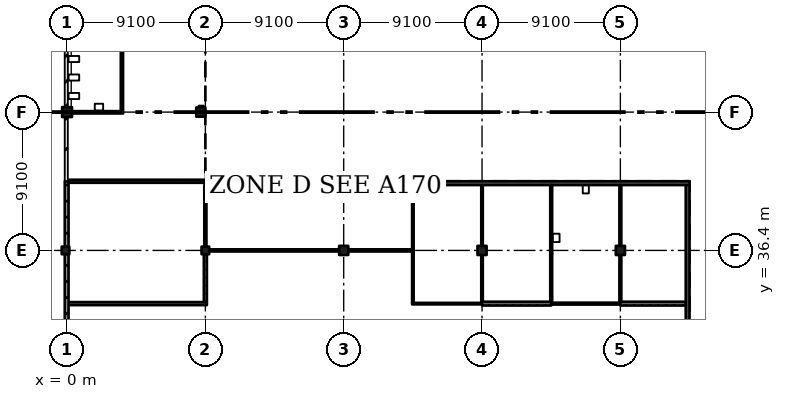
"""IFC4 building model, lengths in metres.
Left out: names, types, materials, properties, quantities, classifications, styles, units other than length and angle.
Written with IfcOpenShell. Run it as: python <this file> out.ifc"""

import sys

from ifc_helpers import new_model, si_unit, direction, frame, frame_2d, origin, origin_2d, place, context, subcontext, project, spatial, rectangle, extrude, element, fill, save


model = new_model("IFC4")
c1 = context("Model", 3, precision=1e-05, world=origin(), true_north=direction((0.0, 1.0)))
c2 = subcontext(c1, "Body", "Model", "MODEL_VIEW")
j1 = project(units=[si_unit("LENGTHUNIT", "METRE"), si_unit("PLANEANGLEUNIT", "RADIAN")], contexts=[c1])
p1 = place(None, origin())
s1 = spatial("IfcSite", under=j1, at=p1, CompositionType="ELEMENT")
p2 = place(p1, origin())
s2 = spatial("IfcBuilding", under=s1, at=p2, CompositionType="ELEMENT")
p3 = place(p2, frame((0.0, 0.0, 24.57)))
s3 = spatial("IfcBuildingStorey", under=s2, at=p3, CompositionType="ELEMENT", Elevation=24.57)
p4 = place(p3, frame((-0.1, 36.4, 0.0), z_axis=(0.0, 0.0, 1.0), x_axis=(1.0, 0.0, 0.0)))
e1 = element("IfcColumn", 1, at=p4, inside=s3, PredefinedType="COLUMN", context=c2, shape_type="SweptSolid", body=[
    extrude(rectangle(XDim=0.5, YDim=0.5, at=origin_2d()), origin(), (0.0, 0.0, 1.0), 4.55),
])
p5 = place(p3, frame((0.0, 45.5, 0.0), z_axis=(0.0, 0.0, 1.0), x_axis=(1.0, 0.0, 0.0)))
e2 = element("IfcColumn", 2, at=p5, inside=s3, PredefinedType="COLUMN", context=c2, shape_type="SweptSolid", body=[
    extrude(rectangle(XDim=0.65, YDim=0.65, at=origin_2d()), origin(), (0.0, 0.0, 1.0), 4.55),
])
p6 = place(p3, frame((9.1, 36.4, 0.0), z_axis=(0.0, 0.0, 1.0), x_axis=(1.0, 0.0, 0.0)))
e3 = element("IfcColumn", 3, at=p6, inside=s3, PredefinedType="COLUMN", context=c2, shape_type="SweptSolid", body=[
    extrude(rectangle(XDim=0.5, YDim=0.5, at=origin_2d()), origin(), (0.0, 0.0, 1.0), 4.55),
])
for number, where, z_axis, x_axis in (
    (4, (8.8, 45.5, 0.0), (0.0, 0.0, 1.0), (1.0, 0.0, 0.0)),
    (5, (18.2, 36.4, 0.0), (0.0, 0.0, 1.0), (1.0, 0.0, 0.0)),
    (6, (27.3, 36.4, 0.0), (0.0, 0.0, 1.0), (1.0, 0.0, 0.0)),
    (7, (36.4, 36.4, 0.0), (0.0, 0.0, 1.0), (1.0, 0.0, 0.0)),
):
    element("IfcColumn", number, at=place(p3, frame(where, z_axis=z_axis, x_axis=x_axis)), inside=s3, PredefinedType="COLUMN", context=c2, shape_type="SweptSolid", body=[
        extrude(rectangle(XDim=0.6, YDim=0.6, at=origin_2d()), origin(), (0.0, 0.0, 1.0), 4.55),
    ])
for number, where, z_axis, x_axis in (
    (8, (40.825, 40.95, 0.0), (0.0, 0.0, 1.0), (0.0, -1.0, 0.0)),
    (9, (40.95, 40.825, 0.0), (0.0, 0.0, 1.0), (-1.0, 0.0, 0.0)),
):
    element("IfcWall", number, at=place(p3, frame(where, z_axis=z_axis, x_axis=x_axis)), inside=s3, PredefinedType="SHEAR", context=c2, shape_type="SweptSolid", body=[
        extrude(rectangle(XDim=31.85, YDim=0.25, at=frame_2d((15.925, 0.0))), origin(), (0.0, 0.0, 1.0), 4.55),
    ])
p7 = place(p3, frame((-0.025, 40.95, 0.0), z_axis=(0.0, 0.0, 1.0), x_axis=(0.0, -1.0, 0.0)))
e10 = element("IfcWall", 10, at=p7, inside=s3, PredefinedType="SOLIDWALL", context=c2, shape_type="SweptSolid", body=[
    extrude(rectangle(XDim=4.3, YDim=0.25, at=frame_2d((2.15, 0.0))), origin(), (0.0, 0.0, 1.0), 3.6),
])
p8 = place(p3, frame((-0.025, 36.15, 0.0), z_axis=(0.0, 0.0, 1.0), x_axis=(0.0, -1.0, 0.0)))
e11 = element("IfcWall", 11, at=p8, inside=s3, PredefinedType="SOLIDWALL", context=c2, shape_type="SweptSolid", body=[
    extrude(rectangle(XDim=8.6, YDim=0.25, at=frame_2d((4.3, 0.0))), origin(), (0.0, 0.0, 1.0), 3.6),
])
p9 = place(p3, frame((0.1, 32.9, 0.0), z_axis=(0.0, 0.0, 1.0), x_axis=(1.0, 0.0, 0.0)))
e12 = element("IfcWall", 12, at=p9, inside=s3, PredefinedType="PARTITIONING", context=c2, shape_type="SweptSolid", body=[
    extrude(rectangle(XDim=9.1, YDim=0.2, at=frame_2d((4.55, 0.0))), origin(), (0.0, 0.0, 1.0), 4.35),
])
p10 = place(p9, frame((1.05, 0.0, 0.0)))
e13 = element("IfcOpeningElement", 13, at=p10, cuts=e12, PredefinedType="OPENING", context=c2, shape_type="SweptSolid", body=[
    extrude(rectangle(XDim=2.4, YDim=2.4, at=frame_2d((1.2, 1.2))), frame((0.0, 0.11, 0.0), z_axis=(0.0, -1.0, 0.0), x_axis=(1.0, 0.0, 0.0)), (0.0, 0.0, 1.0), 0.22),
])
p11 = place(p9, frame((5.65, 0.0, 0.0)))
e14 = element("IfcOpeningElement", 14, at=p11, cuts=e12, PredefinedType="OPENING", context=c2, shape_type="SweptSolid", body=[
    extrude(rectangle(XDim=2.4, YDim=2.4, at=frame_2d((1.2, 1.2))), frame((0.0, 0.11, 0.0), z_axis=(0.0, -1.0, 0.0), x_axis=(1.0, 0.0, 0.0)), (0.0, 0.0, 1.0), 0.22),
])
p12 = place(p3, frame((0.1, 40.95, 0.0), z_axis=(0.0, 0.0, 1.0), x_axis=(1.0, 0.0, 0.0)))
e15 = element("IfcWall", 15, at=p12, inside=s3, PredefinedType="PARTITIONING", context=c2, shape_type="SweptSolid", body=[
    extrude(rectangle(XDim=8.97, YDim=0.2, at=frame_2d((4.485, 0.0))), origin(), (0.0, 0.0, 1.0), 3.55),
])
p13 = place(p12, frame((4.75, 0.0, 0.0)))
e16 = element("IfcOpeningElement", 16, at=p13, cuts=e15, PredefinedType="OPENING", context=c2, shape_type="SweptSolid", body=[
    extrude(rectangle(XDim=3.0, YDim=2.4, at=frame_2d((1.5, 1.2))), frame((0.0, 0.11, 0.0), z_axis=(0.0, -1.0, 0.0), x_axis=(1.0, 0.0, 0.0)), (0.0, 0.0, 1.0), 0.22),
])
p14 = place(p12, frame((0.25, 0.0, 0.0)))
e17 = element("IfcOpeningElement", 17, at=p14, cuts=e15, PredefinedType="OPENING", context=c2, shape_type="SweptSolid", body=[
    extrude(rectangle(XDim=3.0, YDim=2.4, at=frame_2d((1.5, 1.2))), frame((0.0, 0.11, 0.0), z_axis=(0.0, -1.0, 0.0), x_axis=(1.0, 0.0, 0.0)), (0.0, 0.0, 1.0), 0.22),
])
p15 = place(p3, frame((0.325, 45.5, 0.0), z_axis=(0.0, 0.0, 1.0), x_axis=(1.0, 0.0, 0.0)))
e18 = element("IfcWall", 18, at=p15, inside=s3, PredefinedType="PARTITIONING", context=c2, shape_type="SweptSolid", body=[
    extrude(rectangle(XDim=3.338, YDim=0.125, at=frame_2d((1.669, 0.0))), origin(), (0.0, 0.0, 1.0), 3.9),
])
p16 = place(p3, frame((3.6, 45.562, 0.0), z_axis=(0.0, 0.0, 1.0), x_axis=(0.0, 1.0, 0.0)))
e19 = element("IfcWall", 19, at=p16, inside=s3, PredefinedType="PARTITIONING", context=c2, shape_type="SweptSolid", body=[
    extrude(rectangle(XDim=9.038, YDim=0.125, at=frame_2d((4.519, 0.0))), origin(), (0.0, 0.0, 1.0), 3.9),
])
p17 = place(p16, frame((1.75, 0.0, 0.0)))
e20 = element("IfcOpeningElement", 20, at=p17, cuts=e19, PredefinedType="OPENING", context=c2, shape_type="SweptSolid", body=[
    extrude(rectangle(XDim=0.9, YDim=2.1, at=frame_2d((0.45, 1.05))), frame((0.0, 0.073, 0.0), z_axis=(0.0, -1.0, 0.0), x_axis=(1.0, 0.0, 0.0)), (0.0, 0.0, 1.0), 0.145),
])
p18 = place(p16, frame((6.238, 0.0, 0.0)))
e21 = element("IfcOpeningElement", 21, at=p18, cuts=e19, PredefinedType="OPENING", context=c2, shape_type="SweptSolid", body=[
    extrude(rectangle(XDim=1.0, YDim=2.1, at=frame_2d((0.5, 1.05))), frame((0.0, 0.073, 0.0), z_axis=(0.0, -1.0, 0.0), x_axis=(1.0, 0.0, 0.0)), (0.0, 0.0, 1.0), 0.145),
])
p19 = place(p3, frame((8.975, 45.8, 0.0), z_axis=(0.0, 0.0, 1.0), x_axis=(-1.0, 0.0, 0.0)))
e22 = element("IfcWall", 22, at=p19, inside=s3, PredefinedType="PARTITIONING", context=c2, shape_type="SweptSolid", body=[
    extrude(rectangle(XDim=0.3, YDim=0.2, at=frame_2d((0.15, 0.0))), origin(), (0.0, 0.0, 1.0), 8.43),
])
p20 = place(p3, frame((9.1, 33.0, 0.0), z_axis=(0.0, 0.0, 1.0), x_axis=(0.0, 1.0, 0.0)))
e23 = element("IfcWall", 23, at=p20, inside=s3, PredefinedType="PARTITIONING", context=c2, shape_type="SweptSolid", body=[
    extrude(rectangle(XDim=3.15, YDim=0.2, at=frame_2d((1.575, 0.0))), origin(), (0.0, 0.0, 1.0), 3.6),
])
p21 = place(p20, frame((0.35, 0.0, 0.0)))
e24 = element("IfcOpeningElement", 24, at=p21, cuts=e23, PredefinedType="OPENING", context=c2, shape_type="SweptSolid", body=[
    extrude(rectangle(XDim=2.4, YDim=2.4, at=frame_2d((1.2, 1.2))), frame((0.0, 0.11, 0.0), z_axis=(0.0, -1.0, 0.0), x_axis=(1.0, 0.0, 0.0)), (0.0, 0.0, 1.0), 0.22),
])
p22 = place(p3, frame((9.1, 36.65, 0.0), z_axis=(0.0, 0.0, 1.0), x_axis=(0.0, 1.0, 0.0)))
e25 = element("IfcWall", 25, at=p22, inside=s3, PredefinedType="SOLIDWALL", context=c2, shape_type="SweptSolid", body=[
    extrude(rectangle(XDim=4.05, YDim=0.14, at=frame_2d((2.025, 0.0))), origin(), (0.0, 0.0, 1.0), 3.6),
])
p23 = place(p3, frame((17.9, 36.4, 0.0), z_axis=(0.0, 0.0, 1.0), x_axis=(-1.0, 0.0, 0.0)))
e26 = element("IfcWall", 26, at=p23, inside=s3, PredefinedType="SOLIDWALL", context=c2, shape_type="SweptSolid", body=[
    extrude(rectangle(XDim=8.55, YDim=0.14, at=frame_2d((4.275, 0.0))), origin(), (0.0, 0.0, 1.0), 3.6),
])
p24 = place(p23, frame((3.55, 0.0, 0.0)))
e27 = element("IfcOpeningElement", 27, at=p24, cuts=e26, PredefinedType="OPENING", context=c2, shape_type="SweptSolid", body=[
    extrude(rectangle(XDim=1.5, YDim=2.1, at=frame_2d((0.75, 1.05))), frame((0.0, 0.08, 0.0), z_axis=(0.0, -1.0, 0.0), x_axis=(1.0, 0.0, 0.0)), (0.0, 0.0, 1.0), 0.16),
])
p25 = place(p3, frame((22.7, 36.4, 0.0), z_axis=(0.0, 0.0, 1.0), x_axis=(-1.0, 0.0, 0.0)))
e28 = element("IfcWall", 28, at=p25, inside=s3, PredefinedType="SOLIDWALL", context=c2, shape_type="SweptSolid", body=[
    extrude(rectangle(XDim=4.2, YDim=0.14, at=frame_2d((2.1, 0.0))), origin(), (0.0, 0.0, 1.0), 3.6),
])
p26 = place(p3, frame((22.75, 32.95, 0.0), z_axis=(0.0, 0.0, 1.0), x_axis=(0.0, 1.0, 0.0)))
e29 = element("IfcWall", 29, at=p26, inside=s3, PredefinedType="SOLIDWALL", context=c2, shape_type="SweptSolid", body=[
    extrude(rectangle(XDim=3.45, YDim=0.1, at=frame_2d((1.725, 0.0))), origin(), (0.0, 0.0, 1.0), 3.65),
])
p27 = place(p3, frame((22.75, 40.7, 0.0), z_axis=(0.0, 0.0, 1.0), x_axis=(0.0, -1.0, 0.0)))
e30 = element("IfcWall", 30, at=p27, inside=s3, PredefinedType="SOLIDWALL", context=c2, shape_type="SweptSolid", body=[
    extrude(rectangle(XDim=4.3, YDim=0.1, at=frame_2d((2.15, 0.0))), origin(), (0.0, 0.0, 1.0), 4.35),
])
p28 = place(p3, frame((27.3, 32.9, 0.0), z_axis=(0.0, 0.0, 1.0), x_axis=(-1.0, 0.0, 0.0)))
e31 = element("IfcWall", 31, at=p28, inside=s3, PredefinedType="SOLIDWALL", context=c2, shape_type="SweptSolid", body=[
    extrude(rectangle(XDim=4.6, YDim=0.1, at=frame_2d((2.3, 0.0))), origin(), (0.0, 0.0, 1.0), 4.35),
])
p29 = place(p28, frame((1.85, 0.0, 0.0)))
e32 = element("IfcOpeningElement", 32, at=p29, cuts=e31, PredefinedType="OPENING", context=c2, shape_type="SweptSolid", body=[
    extrude(rectangle(XDim=1.0, YDim=2.0, at=frame_2d((0.5, 1.0))), frame((0.0, 0.06, 0.0), z_axis=(0.0, -1.0, 0.0), x_axis=(1.0, 0.0, 0.0)), (0.0, 0.0, 1.0), 0.12),
])
p30 = place(p3, frame((27.3, 36.1, 0.0), z_axis=(0.0, 0.0, 1.0), x_axis=(0.0, -1.0, 0.0)))
e33 = element("IfcWall", 33, at=p30, inside=s3, PredefinedType="SOLIDWALL", context=c2, shape_type="SweptSolid", body=[
    extrude(rectangle(XDim=3.075, YDim=0.1, at=frame_2d((1.538, 0.0))), origin(), (0.0, 0.0, 1.0), 3.6),
])
p31 = place(p3, frame((27.3, 40.7, 0.0), z_axis=(0.0, 0.0, 1.0), x_axis=(0.0, -1.0, 0.0)))
e34 = element("IfcWall", 34, at=p31, inside=s3, PredefinedType="SOLIDWALL", context=c2, shape_type="SweptSolid", body=[
    extrude(rectangle(XDim=4.0, YDim=0.1, at=frame_2d((2.0, 0.0))), origin(), (0.0, 0.0, 1.0), 4.35),
])
p32 = place(p3, frame((31.85, 32.9, 0.0), z_axis=(0.0, 0.0, 1.0), x_axis=(-1.0, 0.0, 0.0)))
e35 = element("IfcWall", 35, at=p32, inside=s3, PredefinedType="SOLIDWALL", context=c2, shape_type="SweptSolid", body=[
    extrude(rectangle(XDim=4.55, YDim=0.25, at=frame_2d((2.275, 0.0))), origin(), (0.0, 0.0, 1.0), 4.35),
])
p33 = place(p32, frame((1.75, 0.0, 0.0)))
e36 = element("IfcOpeningElement", 36, at=p33, cuts=e35, PredefinedType="OPENING", context=c2, shape_type="SweptSolid", body=[
    extrude(rectangle(XDim=1.0, YDim=2.1, at=frame_2d((0.5, 1.05))), frame((0.0, 0.135, 0.0), z_axis=(0.0, -1.0, 0.0), x_axis=(1.0, 0.0, 0.0)), (0.0, 0.0, 1.0), 0.27),
])
p34 = place(p3, frame((31.85, 40.7, 0.0), z_axis=(0.0, 0.0, 1.0), x_axis=(0.0, -1.0, 0.0)))
e37 = element("IfcWall", 37, at=p34, inside=s3, PredefinedType="PARTITIONING", context=c2, shape_type="SweptSolid", body=[
    extrude(rectangle(XDim=4.5, YDim=0.125, at=frame_2d((2.25, 0.0))), origin(), (0.0, 0.0, 1.0), 4.35),
])
p35 = place(p3, frame((36.4, 32.9, 0.0), z_axis=(0.0, 0.0, 1.0), x_axis=(-1.0, 0.0, 0.0)))
e38 = element("IfcWall", 38, at=p35, inside=s3, PredefinedType="PARTITIONING", context=c2, shape_type="SweptSolid", body=[
    extrude(rectangle(XDim=4.55, YDim=0.125, at=frame_2d((2.275, 0.0))), origin(), (0.0, 0.0, 1.0), 4.35),
])
p36 = place(p35, frame((1.75, 0.0, 0.0)))
e39 = element("IfcOpeningElement", 39, at=p36, cuts=e38, PredefinedType="OPENING", context=c2, shape_type="SweptSolid", body=[
    extrude(rectangle(XDim=1.0, YDim=2.1, at=frame_2d((0.5, 1.05))), frame((0.0, 0.073, 0.0), z_axis=(0.0, -1.0, 0.0), x_axis=(1.0, 0.0, 0.0)), (0.0, 0.0, 1.0), 0.145),
])
p37 = place(p3, frame((36.4, 36.1, 0.0), z_axis=(0.0, 0.0, 1.0), x_axis=(0.0, -1.0, 0.0)))
e40 = element("IfcWall", 40, at=p37, inside=s3, PredefinedType="PARTITIONING", context=c2, shape_type="SweptSolid", body=[
    extrude(rectangle(XDim=3.075, YDim=0.125, at=frame_2d((1.538, 0.0))), origin(), (0.0, 0.0, 1.0), 3.6),
])
p38 = place(p3, frame((36.4, 40.7, 0.0), z_axis=(0.0, 0.0, 1.0), x_axis=(0.0, -1.0, 0.0)))
e41 = element("IfcWall", 41, at=p38, inside=s3, PredefinedType="PARTITIONING", context=c2, shape_type="SweptSolid", body=[
    extrude(rectangle(XDim=4.0, YDim=0.125, at=frame_2d((2.0, 0.0))), origin(), (0.0, 0.0, 1.0), 4.35),
])
p39 = place(p3, frame((40.7, 32.9, 0.0), z_axis=(0.0, 0.0, 1.0), x_axis=(-1.0, 0.0, 0.0)))
e42 = element("IfcWall", 42, at=p39, inside=s3, PredefinedType="SOLIDWALL", context=c2, shape_type="SweptSolid", body=[
    extrude(rectangle(XDim=4.3, YDim=0.25, at=frame_2d((2.15, 0.0))), origin(), (0.0, 0.0, 1.0), 4.35),
])
p40 = place(p39, frame((1.75, 0.0, 0.0)))
e43 = element("IfcOpeningElement", 43, at=p40, cuts=e42, PredefinedType="OPENING", context=c2, shape_type="SweptSolid", body=[
    extrude(rectangle(XDim=0.8, YDim=2.1, at=frame_2d((0.4, 1.05))), frame((0.0, 0.135, 0.0), z_axis=(0.0, -1.0, 0.0), x_axis=(1.0, 0.0, 0.0)), (0.0, 0.0, 1.0), 0.27),
])
p41 = place(p3, frame((31.85, 36.2, 0.0), z_axis=(0.0, 0.0, 1.0), x_axis=(0.0, -1.0, 0.0)))
e44 = element("IfcWall", 44, at=p41, inside=s3, PredefinedType="PARTITIONING", context=c2, shape_type="SweptSolid", body=[
    extrude(rectangle(XDim=3.175, YDim=0.125, at=frame_2d((1.587, 0.0))), origin(), (0.0, 0.0, 1.0), 3.65),
])
p42 = place(p24, origin())
e45 = element("IfcDoor", 45, at=p42, inside=s3, OperationType="DOUBLE_DOOR_SINGLE_SWING", PredefinedType="DOOR", context=c2, shape_type="SweptSolid", body=[
    extrude(rectangle(XDim=1.5, YDim=2.1, at=frame_2d((0.75, 1.05))), frame((0.0, 0.025, 0.0), z_axis=(0.0, -1.0, 0.0), x_axis=(1.0, 0.0, 0.0)), (0.0, 0.0, 1.0), 0.05),
])
fill(e27, e45)
p43 = place(p29, origin())
e46 = element("IfcDoor", 46, at=p43, inside=s3, OperationType="SINGLE_SWING_RIGHT", PredefinedType="DOOR", context=c2, shape_type="SweptSolid", body=[
    extrude(rectangle(XDim=1.0, YDim=2.0, at=frame_2d((0.5, 1.0))), frame((0.0, 0.025, 0.0), z_axis=(0.0, -1.0, 0.0), x_axis=(1.0, 0.0, 0.0)), (0.0, 0.0, 1.0), 0.05),
])
fill(e32, e46)
p44 = place(p33, origin())
e47 = element("IfcDoor", 47, at=p44, inside=s3, OperationType="SINGLE_SWING_LEFT", PredefinedType="DOOR", context=c2, shape_type="SweptSolid", body=[
    extrude(rectangle(XDim=1.0, YDim=2.1, at=frame_2d((0.5, 1.05))), frame((0.0, 0.025, 0.0), z_axis=(0.0, -1.0, 0.0), x_axis=(1.0, 0.0, 0.0)), (0.0, 0.0, 1.0), 0.05),
])
fill(e36, e47)
p45 = place(p36, origin())
e48 = element("IfcDoor", 48, at=p45, inside=s3, OperationType="SINGLE_SWING_LEFT", PredefinedType="DOOR", context=c2, shape_type="SweptSolid", body=[
    extrude(rectangle(XDim=1.0, YDim=2.1, at=frame_2d((0.5, 1.05))), frame((0.0, 0.025, 0.0), z_axis=(0.0, -1.0, 0.0), x_axis=(1.0, 0.0, 0.0)), (0.0, 0.0, 1.0), 0.05),
])
fill(e39, e48)
p46 = place(p40, origin())
e49 = element("IfcDoor", 49, at=p46, inside=s3, OperationType="SINGLE_SWING_LEFT", PredefinedType="DOOR", context=c2, shape_type="SweptSolid", body=[
    extrude(rectangle(XDim=0.8, YDim=2.1, at=frame_2d((0.4, 1.05))), frame((0.0, 0.025, 0.0), z_axis=(0.0, -1.0, 0.0), x_axis=(1.0, 0.0, 0.0)), (0.0, 0.0, 1.0), 0.05),
])
fill(e43, e49)
p47 = place(p17, origin())
e50 = element("IfcDoor", 50, at=p47, inside=s3, OperationType="SINGLE_SWING_RIGHT", PredefinedType="DOOR", context=c2, shape_type="SweptSolid", body=[
    extrude(rectangle(XDim=0.9, YDim=2.1, at=frame_2d((0.45, 1.05))), frame((0.0, 0.025, 0.0), z_axis=(0.0, -1.0, 0.0), x_axis=(1.0, 0.0, 0.0)), (0.0, 0.0, 1.0), 0.05),
])
fill(e20, e50)
p48 = place(p10, origin())
e51 = element("IfcDoor", 51, at=p48, inside=s3, OperationType="DOUBLE_DOOR_SINGLE_SWING", PredefinedType="DOOR", context=c2, shape_type="SweptSolid", body=[
    extrude(rectangle(XDim=2.4, YDim=2.4, at=frame_2d((1.2, 1.2))), frame((0.0, 0.025, 0.0), z_axis=(0.0, -1.0, 0.0), x_axis=(1.0, 0.0, 0.0)), (0.0, 0.0, 1.0), 0.05),
])
fill(e13, e51)
p49 = place(p11, origin())
e52 = element("IfcDoor", 52, at=p49, inside=s3, OperationType="DOUBLE_DOOR_SINGLE_SWING", PredefinedType="DOOR", context=c2, shape_type="SweptSolid", body=[
    extrude(rectangle(XDim=2.4, YDim=2.4, at=frame_2d((1.2, 1.2))), frame((0.0, 0.025, 0.0), z_axis=(0.0, -1.0, 0.0), x_axis=(1.0, 0.0, 0.0)), (0.0, 0.0, 1.0), 0.05),
])
fill(e14, e52)
p50 = place(p21, origin())
e53 = element("IfcDoor", 53, at=p50, inside=s3, OperationType="DOUBLE_DOOR_SINGLE_SWING", PredefinedType="DOOR", context=c2, shape_type="SweptSolid", body=[
    extrude(rectangle(XDim=2.4, YDim=2.4, at=frame_2d((1.2, 1.2))), frame((0.0, 0.025, 0.0), z_axis=(0.0, -1.0, 0.0), x_axis=(1.0, 0.0, 0.0)), (0.0, 0.0, 1.0), 0.05),
])
fill(e24, e53)
p51 = place(p13, origin())
e54 = element("IfcDoor", 54, at=p51, inside=s3, OperationType="DOUBLE_DOOR_SINGLE_SWING", PredefinedType="DOOR", context=c2, shape_type="SweptSolid", body=[
    extrude(rectangle(XDim=3.0, YDim=2.4, at=frame_2d((1.5, 1.2))), frame((0.0, 0.025, 0.0), z_axis=(0.0, -1.0, 0.0), x_axis=(1.0, 0.0, 0.0)), (0.0, 0.0, 1.0), 0.05),
])
fill(e16, e54)
p52 = place(p14, origin())
e55 = element("IfcDoor", 55, at=p52, inside=s3, OperationType="DOUBLE_DOOR_SINGLE_SWING", PredefinedType="DOOR", context=c2, shape_type="SweptSolid", body=[
    extrude(rectangle(XDim=3.0, YDim=2.4, at=frame_2d((1.5, 1.2))), frame((0.0, 0.025, 0.0), z_axis=(0.0, -1.0, 0.0), x_axis=(1.0, 0.0, 0.0)), (0.0, 0.0, 1.0), 0.05),
])
fill(e17, e55)
save(model, sys.argv[1])
